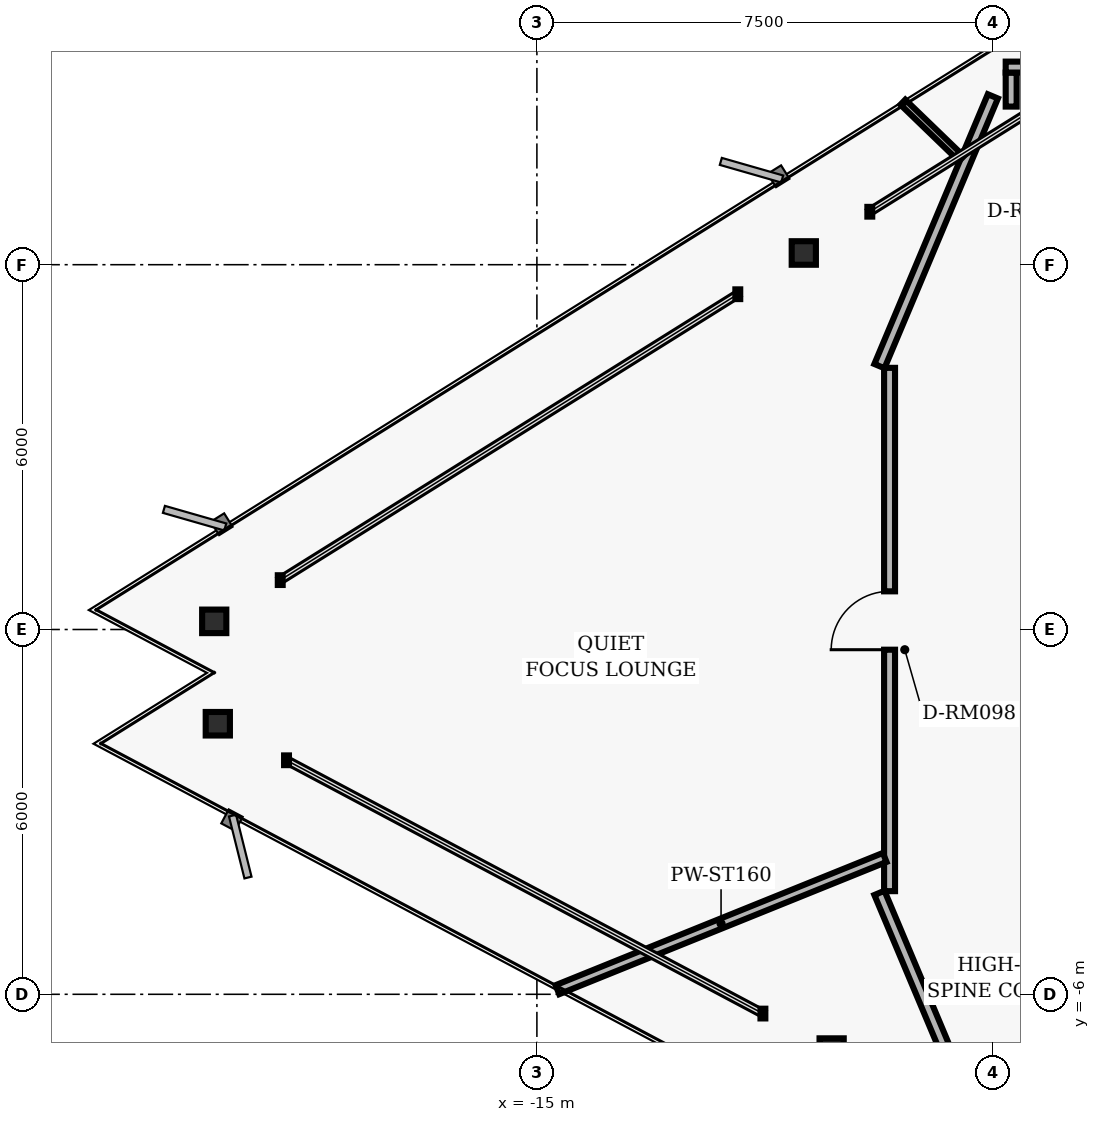
"""IFC4 building model, lengths in metres.
Left out: names, types, materials, properties, quantities, classifications, styles, units other than length and angle.
Written with IfcOpenShell. Run it as: python <this file> out.ifc"""

import sys

from ifc_helpers import new_model, si_unit, direction, frame, frame_2d, origin, origin_2d, place, context, subcontext, project, spatial, rectangle, i_section, extrude, element, fill, save


model = new_model("IFC4")
c1 = context("Model", 3, precision=1e-05, world=origin(), true_north=direction((0.0, 1.0)))
c2 = subcontext(c1, "Body", "Model", "MODEL_VIEW")
j1 = project(units=[si_unit("LENGTHUNIT", "METRE"), si_unit("PLANEANGLEUNIT", "RADIAN")], contexts=[c1])
p1 = place(None, origin())
s1 = spatial("IfcSite", under=j1, at=p1, CompositionType="ELEMENT")
p2 = place(p1, origin())
s2 = spatial("IfcBuilding", under=s1, at=p2, CompositionType="ELEMENT")
p3 = place(p2, frame((0.0, 0.0, 202.72)))
s3 = spatial("IfcBuildingStorey", under=s2, at=p3, CompositionType="ELEMENT", Elevation=202.72)
for number, where, z_axis, x_axis in (
    (1, (-10.611, 6.193, 0.0), (0.0, 0.0, 1.0), (1.0, 0.0, 0.0)),
    (2, (-20.307, 0.134, 0.0), (0.0, 0.0, 1.0), (1.0, 0.0, 0.0)),
    (3, (-20.248, -1.55, 0.0), (0.0, 0.0, 1.0), (1.0, 0.0, 0.0)),
    (4, (-10.153, -6.918, 0.0), (0.0, 0.0, 1.0), (1.0, 0.0, 0.0)),
):
    element("IfcColumn", number, at=place(p3, frame(where, z_axis=z_axis, x_axis=x_axis)), inside=s3, PredefinedType="COLUMN", context=c2, shape_type="SweptSolid", body=[
        extrude(i_section(OverallWidth=0.398, OverallDepth=0.387, WebThickness=0.021, FlangeThickness=0.033, FilletRadius=0.018, at=origin_2d()), origin(), (0.0, 0.0, 1.0), 3.04),
    ])
p4 = place(p3, frame((-7.501, -8.769, 0.0), z_axis=(0.0, 0.0, 1.0), x_axis=(-0.387573945081, 0.921838617706, 0.0)))
e5 = element("IfcWall", 5, at=p4, inside=s3, PredefinedType="PARTITIONING", context=c2, shape_type="SweptSolid", body=[
    extrude(rectangle(XDim=4.813, YDim=0.18, at=frame_2d((2.407, 0.0))), origin(), (0.0, 0.0, 1.0), 2.773),
])
p5 = place(p3, frame((-9.2, -4.303, 0.0), z_axis=(0.0, 0.0, 1.0), x_axis=(0.0, 1.0, 0.0)))
e6 = element("IfcWall", 6, at=p5, inside=s3, PredefinedType="PARTITIONING", context=c2, shape_type="SweptSolid", body=[
    extrude(rectangle(XDim=8.607, YDim=0.18, at=frame_2d((4.303, 0.0))), origin(), (0.0, 0.0, 1.0), 2.773),
])
p6 = place(p5, frame((3.971, 0.0, 0.0)))
e7 = element("IfcOpeningElement", 7, at=p6, cuts=e6, PredefinedType="OPENING", context=c2, shape_type="SweptSolid", body=[
    extrude(rectangle(XDim=0.96, YDim=2.02, at=frame_2d((0.48, 1.01))), frame((0.0, 0.1, 0.0), z_axis=(0.0, -1.0, 0.0), x_axis=(1.0, 0.0, 0.0)), (0.0, 0.0, 1.0), 0.2),
])
p7 = place(p3, frame((-9.367, 4.332, 0.0), z_axis=(0.0, 0.0, 1.0), x_axis=(0.387573945081, 0.921838617706, 0.0)))
e8 = element("IfcWall", 8, at=p7, inside=s3, PredefinedType="PARTITIONING", context=c2, shape_type="SweptSolid", body=[
    extrude(rectangle(XDim=4.813, YDim=0.18, at=frame_2d((2.407, 0.0))), origin(), (0.0, 0.0, 1.0), 2.773),
])
p8 = place(p3, frame((-7.2, 8.601, 0.0), z_axis=(0.0, 0.0, 1.0), x_axis=(0.0, 1.0, 0.0)))
e9 = element("IfcWall", 9, at=p8, inside=s3, PredefinedType="PARTITIONING", context=c2, shape_type="SweptSolid", body=[
    extrude(rectangle(XDim=0.559, YDim=0.18, at=frame_2d((0.28, 0.0))), origin(), (0.0, 0.0, 1.0), 2.773),
])
p9 = place(p3, frame((-7.29, 9.25, 0.0), z_axis=(0.0, 0.0, 1.0), x_axis=(1.0, 0.0, 0.0)))
e10 = element("IfcWall", 10, at=p9, inside=s3, PredefinedType="PARTITIONING", context=c2, shape_type="SweptSolid", body=[
    extrude(rectangle(XDim=13.3, YDim=0.18, at=frame_2d((6.65, 0.0))), origin(), (0.0, 0.0, 1.0), 2.773),
])
p10 = place(p9, frame((11.573, 0.0, 0.0)))
e11 = element("IfcOpeningElement", 11, at=p10, cuts=e10, PredefinedType="OPENING", context=c2, shape_type="SweptSolid", body=[
    extrude(rectangle(XDim=0.96, YDim=2.02, at=frame_2d((0.48, 1.01))), frame((0.0, 0.1, 0.0), z_axis=(0.0, -1.0, 0.0), x_axis=(1.0, 0.0, 0.0)), (0.0, 0.0, 1.0), 0.2),
])
p11 = place(p9, frame((5.149, 0.0, 0.0)))
e12 = element("IfcOpeningElement", 12, at=p11, cuts=e10, PredefinedType="OPENING", context=c2, shape_type="SweptSolid", body=[
    extrude(rectangle(XDim=1.02, YDim=2.02, at=frame_2d((0.51, 1.01))), frame((0.0, 0.1, 0.0), z_axis=(0.0, -1.0, 0.0), x_axis=(1.0, 0.0, 0.0)), (0.0, 0.0, 1.0), 0.2),
])
p12 = place(p3, frame((-9.28, -3.75, 0.0), z_axis=(0.0, 0.0, 1.0), x_axis=(-0.927192124848, -0.374586123102, 0.0)))
e13 = element("IfcWall", 13, at=p12, inside=s3, PredefinedType="PARTITIONING", context=c2, shape_type="SweptSolid", body=[
    extrude(rectangle(XDim=5.805, YDim=0.16, at=frame_2d((2.903, 0.0))), origin(), (0.0, 0.0, 1.0), 2.773),
])
p13 = place(p3, frame((-8.019, 7.744, 0.0), z_axis=(0.0, 0.0, 1.0), x_axis=(-0.719319685721, 0.694679199151, 0.0)))
e14 = element("IfcWall", 14, at=p13, inside=s3, PredefinedType="MOVABLE", context=c2, shape_type="SweptSolid", body=[
    extrude(rectangle(XDim=1.338, YDim=0.115, at=frame_2d((0.669, 0.0))), origin(), (0.0, 0.0, 1.0), 2.773),
])
p14 = place(p6, origin())
e15 = element("IfcDoor", 15, at=p14, inside=s3, OperationType="SINGLE_SWING_LEFT", PredefinedType="DOOR", context=c2, shape_type="SweptSolid", body=[
    extrude(rectangle(XDim=0.96, YDim=2.02, at=frame_2d((0.48, 1.01))), frame((0.0, 0.025, 0.0), z_axis=(0.0, -1.0, 0.0), x_axis=(1.0, 0.0, 0.0)), (0.0, 0.0, 1.0), 0.05),
])
fill(e7, e15)
save(model, sys.argv[1])
